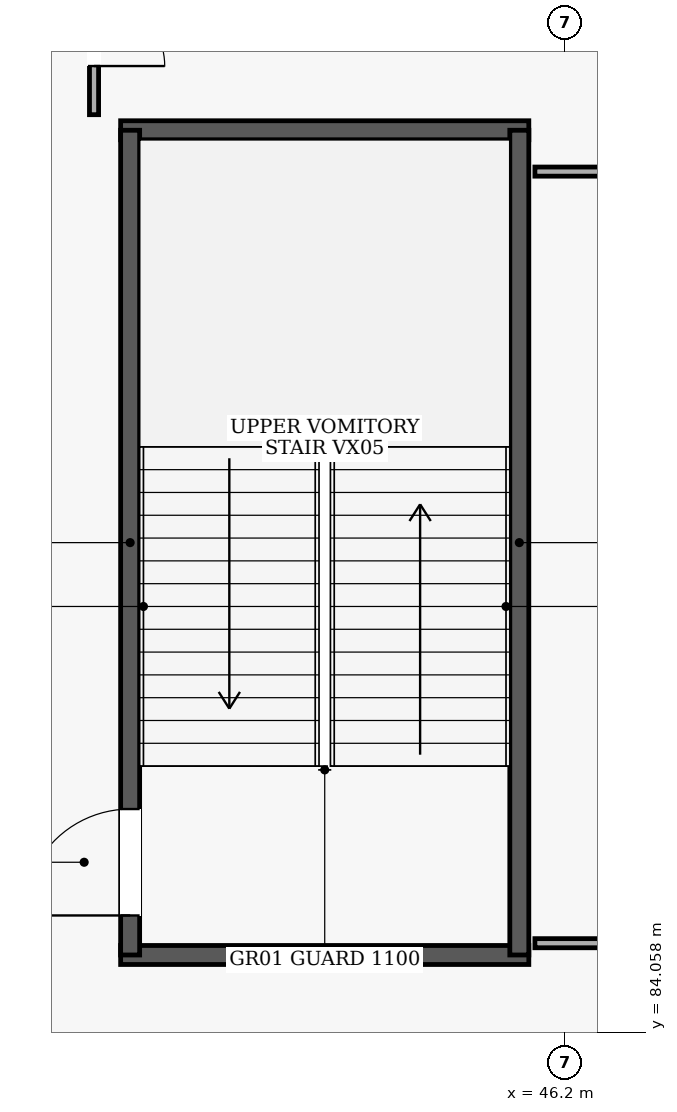
"""IFC4 building model, lengths in metres.
Left out: names, types, materials, properties, quantities, classifications, styles, units other than length and angle.
Written with IfcOpenShell. Run it as: python <this file> out.ifc"""

import sys

from ifc_helpers import new_model, si_unit, direction, frame, frame_2d, origin, place, context, subcontext, project, spatial, rectangle, extrude, element, fill, save


model = new_model("IFC4")
c1 = context("Model", 3, precision=1e-05, world=origin(), true_north=direction((0.0, 1.0)))
c2 = subcontext(c1, "Body", "Model", "MODEL_VIEW")
j1 = project(units=[si_unit("LENGTHUNIT", "METRE"), si_unit("PLANEANGLEUNIT", "RADIAN")], contexts=[c1])
p1 = place(None, origin())
s1 = spatial("IfcSite", under=j1, at=p1, CompositionType="ELEMENT")
p2 = place(p1, origin())
s2 = spatial("IfcBuilding", under=s1, at=p2, CompositionType="ELEMENT")
p3 = place(p2, frame((0.0, 0.0, 10.2)))
s3 = spatial("IfcBuildingStorey", under=s2, at=p3, CompositionType="ELEMENT", Elevation=10.2)
for number, where, z_axis, x_axis in (
    (1, (40.35, 85.075, 0.0), (0.0, 0.0, 1.0), (1.0, 0.0, 0.0)),
    (2, (45.72, 95.925, 0.0), (0.0, 0.0, 1.0), (-1.0, 0.0, 0.0)),
):
    element("IfcWall", number, at=place(p3, frame(where, z_axis=z_axis, x_axis=x_axis)), inside=s3, PredefinedType="SHEAR", context=c2, shape_type="SweptSolid", body=[
        extrude(rectangle(XDim=5.37, YDim=0.25, at=frame_2d((2.685, 0.0))), origin(), (0.0, 0.0, 1.0), 4.48),
    ])
p4 = place(p3, frame((40.475, 85.075, 0.0), z_axis=(0.0, 0.0, 1.0), x_axis=(0.0, 1.0, 0.0)))
e3 = element("IfcWall", 3, at=p4, inside=s3, PredefinedType="SHEAR", context=c2, shape_type="SweptSolid", body=[
    extrude(rectangle(XDim=10.85, YDim=0.25, at=frame_2d((5.425, 0.0))), origin(), (0.0, 0.0, 1.0), 4.48),
])
p5 = place(p4, frame((0.52, 0.0, 0.0)))
e4 = element("IfcOpeningElement", 4, at=p5, cuts=e3, PredefinedType="OPENING", context=c2, shape_type="SweptSolid", body=[
    extrude(rectangle(XDim=1.4, YDim=2.15, at=frame_2d((0.7, 1.075))), frame((0.0, 0.135, 0.0), z_axis=(0.0, -1.0, 0.0), x_axis=(1.0, 0.0, 0.0)), (0.0, 0.0, 1.0), 0.27),
])
p6 = place(p3, frame((45.595, 85.075, 0.0), z_axis=(0.0, 0.0, 1.0), x_axis=(0.0, 1.0, 0.0)))
e5 = element("IfcWall", 5, at=p6, inside=s3, PredefinedType="SHEAR", context=c2, shape_type="SweptSolid", body=[
    extrude(rectangle(XDim=10.85, YDim=0.25, at=frame_2d((5.425, 0.0))), origin(), (0.0, 0.0, 1.0), 4.48),
])
p7 = place(p3, frame((45.8, 85.23, 0.0), z_axis=(0.0, 0.0, 1.0), x_axis=(1.0, 0.0, 0.0)))
e6 = element("IfcWall", 6, at=p7, inside=s3, PredefinedType="PARTITIONING", context=c2, shape_type="SweptSolid", body=[
    extrude(rectangle(XDim=14.8, YDim=0.12, at=frame_2d((7.4, 0.0))), origin(), (0.0, 0.0, 1.0), 4.48),
])
p8 = place(p7, frame((6.52, 0.0, 0.0)))
e7 = element("IfcOpeningElement", 7, at=p8, cuts=e6, PredefinedType="OPENING", context=c2, shape_type="SweptSolid", body=[
    extrude(rectangle(XDim=1.76, YDim=2.25, at=frame_2d((0.88, 1.125))), frame((0.0, 0.07, 0.0), z_axis=(0.0, -1.0, 0.0), x_axis=(1.0, 0.0, 0.0)), (0.0, 0.0, 1.0), 0.14),
])
p9 = place(p3, frame((60.6, 95.381, 0.0), z_axis=(0.0, 0.0, 1.0), x_axis=(-1.0, 0.0, 0.0)))
e8 = element("IfcWall", 8, at=p9, inside=s3, PredefinedType="PARTITIONING", context=c2, shape_type="SweptSolid", body=[
    extrude(rectangle(XDim=14.8, YDim=0.12, at=frame_2d((7.4, 0.0))), origin(), (0.0, 0.0, 1.0), 4.48),
])
p10 = place(p3, frame((40.0, 99.27, 0.0), z_axis=(0.0, 0.0, 1.0), x_axis=(0.0, -1.0, 0.0)))
e9 = element("IfcWall", 9, at=p10, inside=s3, PredefinedType="PARTITIONING", context=c2, shape_type="SweptSolid", body=[
    extrude(rectangle(XDim=3.14, YDim=0.12, at=frame_2d((1.57, 0.0))), origin(), (0.0, 0.0, 1.0), 4.48),
])
p11 = place(p10, frame((0.64, 0.0, 0.0)))
e10 = element("IfcOpeningElement", 10, at=p11, cuts=e9, PredefinedType="OPENING", context=c2, shape_type="SweptSolid", body=[
    extrude(rectangle(XDim=1.86, YDim=2.3, at=frame_2d((0.93, 1.15))), frame((0.0, 0.07, 0.0), z_axis=(0.0, -1.0, 0.0), x_axis=(1.0, 0.0, 0.0)), (0.0, 0.0, 1.0), 0.14),
])
p12 = place(p5, frame((1.4, 0.0, 0.0), z_axis=(0.0, 0.0, 1.0), x_axis=(-1.0, 0.0, 0.0)))
e11 = element("IfcDoor", 11, at=p12, inside=s3, OperationType="SINGLE_SWING_RIGHT", PredefinedType="DOOR", context=c2, shape_type="SweptSolid", body=[
    extrude(rectangle(XDim=1.4, YDim=2.15, at=frame_2d((0.7, 1.075))), frame((0.0, 0.025, 0.0), z_axis=(0.0, -1.0, 0.0), x_axis=(1.0, 0.0, 0.0)), (0.0, 0.0, 1.0), 0.05),
])
fill(e4, e11)
p13 = place(p11, origin())
e12 = element("IfcDoor", 12, at=p13, inside=s3, OperationType="DOUBLE_DOOR_SINGLE_SWING", PredefinedType="DOOR", context=c2, shape_type="SweptSolid", body=[
    extrude(rectangle(XDim=1.86, YDim=2.3, at=frame_2d((0.93, 1.15))), frame((0.0, 0.025, 0.0), z_axis=(0.0, -1.0, 0.0), x_axis=(1.0, 0.0, 0.0)), (0.0, 0.0, 1.0), 0.05),
])
fill(e10, e12)
save(model, sys.argv[1])
